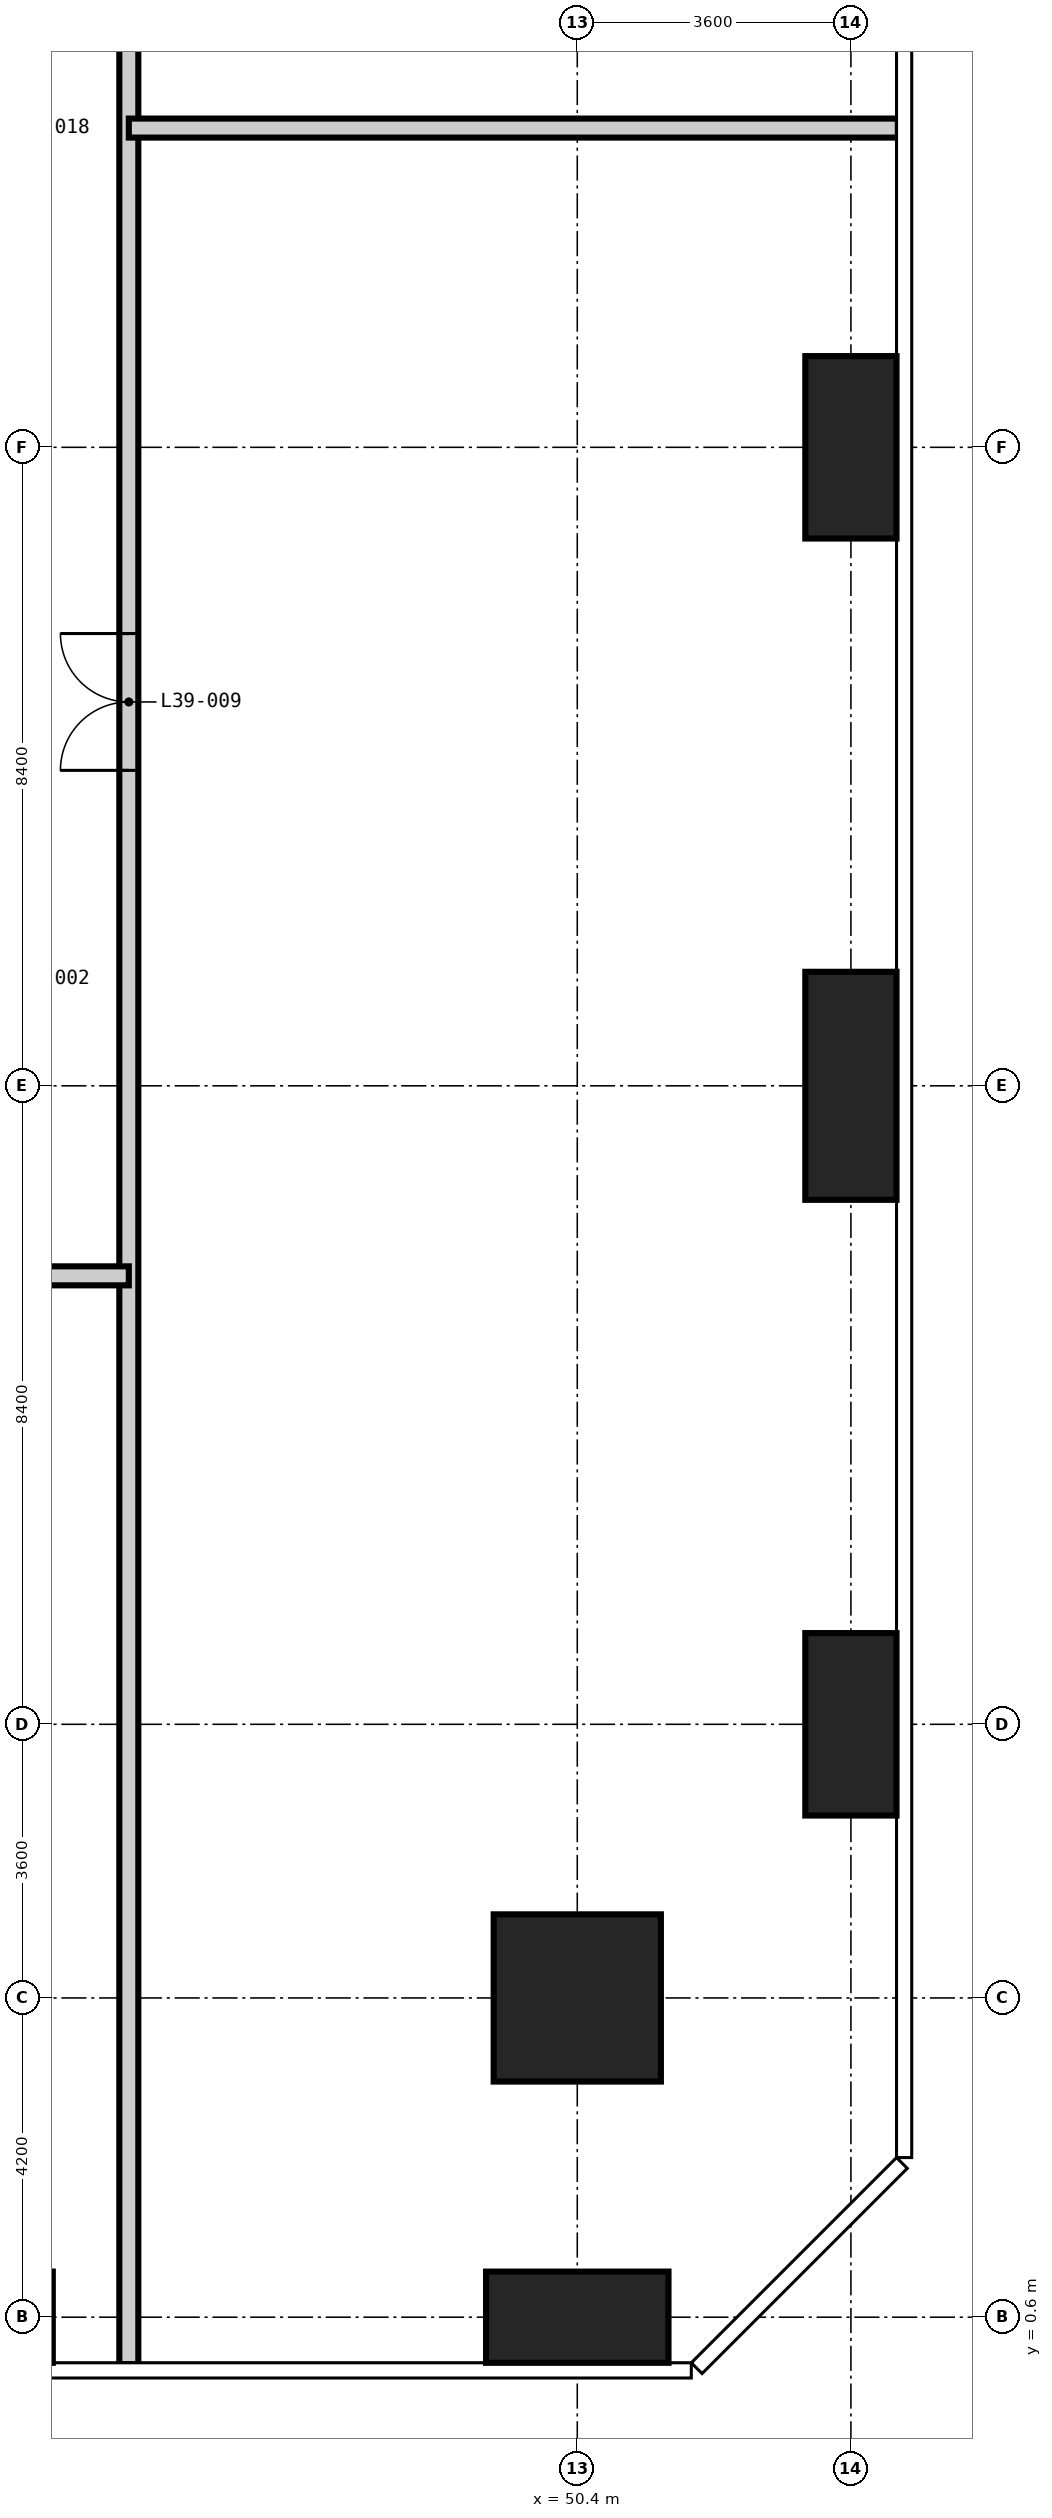
"""IFC4 building model, lengths in metres.
Left out: names, types, materials, properties, quantities, classifications, styles, units other than length and angle.
Written with IfcOpenShell. Run it as: python <this file> out.ifc"""

import sys

from ifc_helpers import new_model, si_unit, direction, frame, frame_2d, origin, origin_2d, place, context, subcontext, project, spatial, rectangle, extrude, element, fill, save


model = new_model("IFC4")
c1 = context("Model", 3, precision=1e-05, world=origin(), true_north=direction((0.0, 1.0)))
c2 = subcontext(c1, "Body", "Model", "MODEL_VIEW")
j1 = project(units=[si_unit("LENGTHUNIT", "METRE"), si_unit("PLANEANGLEUNIT", "RADIAN")], contexts=[c1])
p1 = place(None, origin())
s1 = spatial("IfcSite", under=j1, at=p1, CompositionType="ELEMENT")
p2 = place(p1, origin())
s2 = spatial("IfcBuilding", under=s1, at=p2, CompositionType="ELEMENT")
p3 = place(p2, frame((0.0, 0.0, 153.6)))
s3 = spatial("IfcBuildingStorey", under=s2, at=p3, CompositionType="ELEMENT", Elevation=153.6)
p4 = place(p3, frame((50.4, 0.6, -0.4), z_axis=(0.0, 0.0, 1.0), x_axis=(1.0, 0.0, 0.0)))
e1 = element("IfcColumn", 1, at=p4, inside=s3, PredefinedType="COLUMN", context=c2, shape_type="SweptSolid", body=[
    extrude(rectangle(XDim=2.4, YDim=1.2, at=origin_2d()), origin(), (0.0, 0.0, 1.0), 5.45),
])
p5 = place(p3, frame((50.4, 4.8, -0.4), z_axis=(0.0, 0.0, 1.0), x_axis=(1.0, 0.0, 0.0)))
e2 = element("IfcColumn", 2, at=p5, inside=s3, PredefinedType="COLUMN", context=c2, shape_type="SweptSolid", body=[
    extrude(rectangle(XDim=2.2, YDim=2.2, at=origin_2d()), origin(), (0.0, 0.0, 1.0), 5.45),
])
p6 = place(p3, frame((54.0, 8.4, -0.4), z_axis=(0.0, 0.0, 1.0), x_axis=(1.0, 0.0, 0.0)))
e3 = element("IfcColumn", 3, at=p6, inside=s3, PredefinedType="COLUMN", context=c2, shape_type="SweptSolid", body=[
    extrude(rectangle(XDim=1.2, YDim=2.4, at=origin_2d()), origin(), (0.0, 0.0, 1.0), 5.45),
])
p7 = place(p3, frame((54.0, 16.8, -0.4), z_axis=(0.0, 0.0, 1.0), x_axis=(1.0, 0.0, 0.0)))
e4 = element("IfcColumn", 4, at=p7, inside=s3, PredefinedType="COLUMN", context=c2, shape_type="SweptSolid", body=[
    extrude(rectangle(XDim=1.2, YDim=3.0, at=origin_2d()), origin(), (0.0, 0.0, 1.0), 5.45),
])
p8 = place(p3, frame((54.0, 25.2, -0.4), z_axis=(0.0, 0.0, 1.0), x_axis=(1.0, 0.0, 0.0)))
e5 = element("IfcColumn", 5, at=p8, inside=s3, PredefinedType="COLUMN", context=c2, shape_type="SweptSolid", body=[
    extrude(rectangle(XDim=1.2, YDim=2.4, at=origin_2d()), origin(), (0.0, 0.0, 1.0), 5.45),
])
p9 = place(p3, frame((44.5, -0.018, 0.0), z_axis=(0.0, 0.0, 1.0), x_axis=(0.0, 1.0, 0.0)))
e6 = element("IfcWall", 6, at=p9, inside=s3, PredefinedType="PARTITIONING", context=c2, shape_type="SweptSolid", body=[
    extrude(rectangle(XDim=54.636, YDim=0.25, at=frame_2d((27.318, 0.0))), origin(), (0.0, 0.0, 1.0), 5.05),
])
p10 = place(p9, frame((20.968, 0.0, 0.0)))
e7 = element("IfcOpeningElement", 7, at=p10, cuts=e6, PredefinedType="OPENING", context=c2, shape_type="SweptSolid", body=[
    extrude(rectangle(XDim=1.8, YDim=2.4, at=frame_2d((0.9, 1.2))), frame((0.0, 0.135, 0.0), z_axis=(0.0, -1.0, 0.0), x_axis=(1.0, 0.0, 0.0)), (0.0, 0.0, 1.0), 0.27),
])
p11 = place(p9, frame((38.168, 0.0, 0.0)))
e8 = element("IfcOpeningElement", 8, at=p11, cuts=e6, PredefinedType="OPENING", context=c2, shape_type="SweptSolid", body=[
    extrude(rectangle(XDim=1.8, YDim=2.4, at=frame_2d((0.9, 1.2))), frame((0.0, 0.135, 0.0), z_axis=(0.0, -1.0, 0.0), x_axis=(1.0, 0.0, 0.0)), (0.0, 0.0, 1.0), 0.27),
])
p12 = place(p3, frame((14.3, 14.3, 0.0), z_axis=(0.0, 0.0, 1.0), x_axis=(1.0, 0.0, 0.0)))
e9 = element("IfcWall", 9, at=p12, inside=s3, PredefinedType="PARTITIONING", context=c2, shape_type="SweptSolid", body=[
    extrude(rectangle(XDim=30.2, YDim=0.25, at=frame_2d((15.1, 0.0))), origin(), (0.0, 0.0, 1.0), 5.05),
])
p13 = place(p12, frame((19.65, 0.0, 0.0)))
e10 = element("IfcOpeningElement", 10, at=p13, cuts=e9, PredefinedType="OPENING", context=c2, shape_type="SweptSolid", body=[
    extrude(rectangle(XDim=1.8, YDim=2.4, at=frame_2d((0.9, 1.2))), frame((0.0, 0.135, 0.0), z_axis=(0.0, -1.0, 0.0), x_axis=(1.0, 0.0, 0.0)), (0.0, 0.0, 1.0), 0.27),
])
p14 = place(p12, frame((4.55, 0.0, 0.0)))
e11 = element("IfcOpeningElement", 11, at=p14, cuts=e9, PredefinedType="OPENING", context=c2, shape_type="SweptSolid", body=[
    extrude(rectangle(XDim=1.8, YDim=2.4, at=frame_2d((0.9, 1.2))), frame((0.0, 0.135, 0.0), z_axis=(0.0, -1.0, 0.0), x_axis=(1.0, 0.0, 0.0)), (0.0, 0.0, 1.0), 0.27),
])
p15 = place(p3, frame((44.5, 29.4, 0.0), z_axis=(0.0, 0.0, 1.0), x_axis=(1.0, 0.0, 0.0)))
e12 = element("IfcWall", 12, at=p15, inside=s3, PredefinedType="PARTITIONING", context=c2, shape_type="SweptSolid", body=[
    extrude(rectangle(XDim=10.118, YDim=0.25, at=frame_2d((5.059, 0.0))), origin(), (0.0, 0.0, 1.0), 5.05),
])
p16 = place(p10, origin())
e13 = element("IfcDoor", 13, at=p16, inside=s3, OperationType="DOUBLE_DOOR_DOUBLE_SWING", PredefinedType="DOOR", context=c2, shape_type="SweptSolid", body=[
    extrude(rectangle(XDim=1.8, YDim=2.4, at=frame_2d((0.9, 1.2))), frame((0.0, 0.025, 0.0), z_axis=(0.0, -1.0, 0.0), x_axis=(1.0, 0.0, 0.0)), (0.0, 0.0, 1.0), 0.05),
])
fill(e7, e13)
save(model, sys.argv[1])
